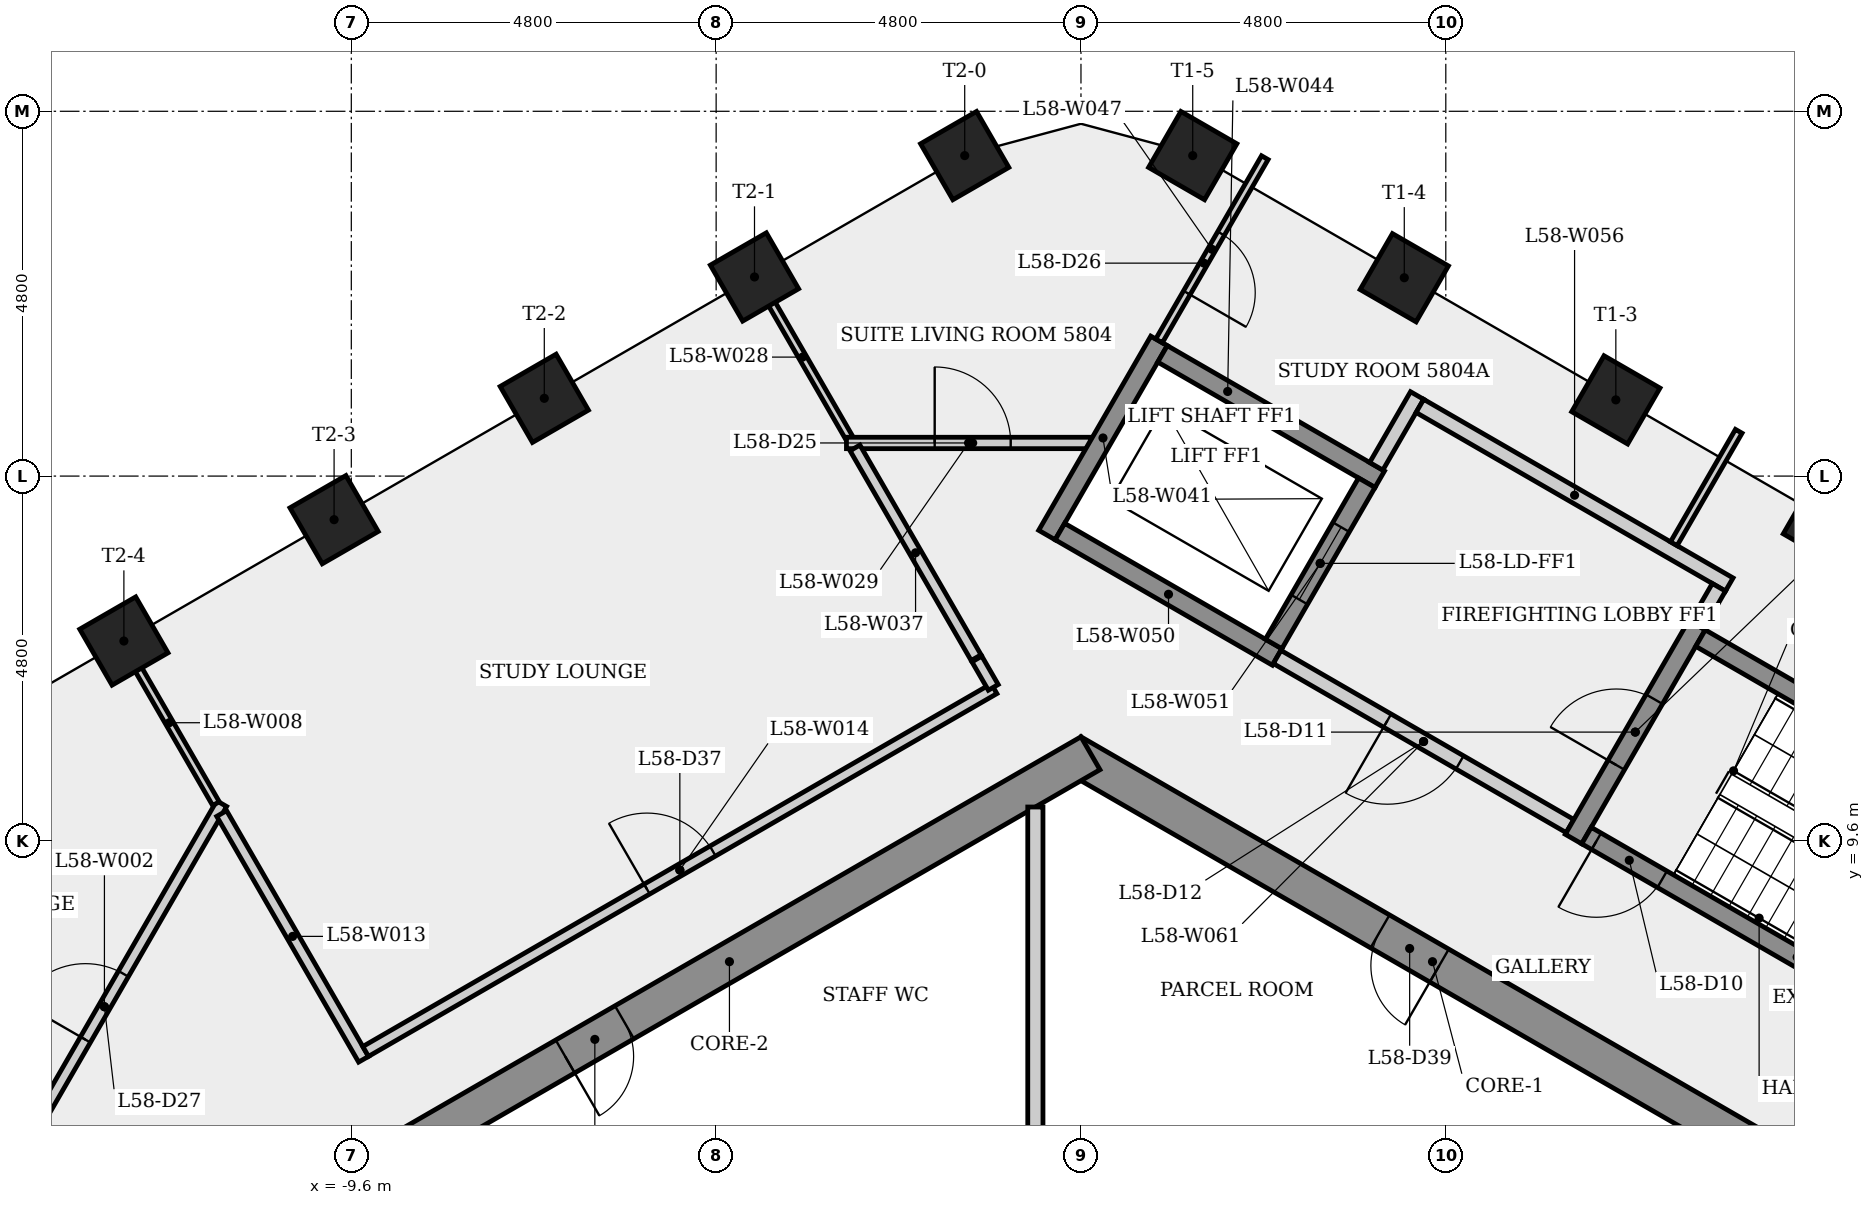
"""IFC4 building model, lengths in metres.
Left out: names, types, materials, properties, quantities, classifications, styles, units other than length and angle.
Written with IfcOpenShell. Run it as: python <this file> out.ifc"""

import sys

from ifc_helpers import new_model, si_unit, direction, frame, frame_2d, origin, origin_2d, place, context, subcontext, project, spatial, rectangle, extrude, element, fill, save


model = new_model("IFC4")
c1 = context("Model", 3, precision=1e-05, world=origin(), true_north=direction((0.0, 1.0)))
c2 = subcontext(c1, "Body", "Model", "MODEL_VIEW")
j1 = project(units=[si_unit("LENGTHUNIT", "METRE"), si_unit("PLANEANGLEUNIT", "RADIAN")], contexts=[c1])
p1 = place(None, origin())
s1 = spatial("IfcSite", under=j1, at=p1, CompositionType="ELEMENT")
p2 = place(p1, origin())
s2 = spatial("IfcBuilding", under=s1, at=p2, CompositionType="ELEMENT")
p3 = place(p2, frame((0.0, 0.0, 218.9)))
s3 = spatial("IfcBuildingStorey", under=s2, at=p3, CompositionType="ELEMENT", Elevation=218.9)
p4 = place(p3, frame((9.375, 5.268, 0.0), z_axis=(0.0, 0.0, 1.0), x_axis=(-0.866023993627, 0.500002442456, 0.0)))
e1 = element("IfcWall", 1, at=p4, inside=s3, PredefinedType="SHEAR", context=c2, shape_type="SweptSolid", body=[
    extrude(rectangle(XDim=10.97, YDim=0.5, at=frame_2d((5.485, 0.0))), origin(), (0.0, 0.0, 1.0), 3.4),
])
p5 = place(p4, frame((5.382, 0.0, 0.0)))
e2 = element("IfcOpeningElement", 2, at=p5, cuts=e1, PredefinedType="OPENING", context=c2, shape_type="SweptSolid", body=[
    extrude(rectangle(XDim=0.9, YDim=2.1, at=frame_2d((0.45, 1.05))), frame((0.0, 0.26, 0.0), z_axis=(0.0, -1.0, 0.0), x_axis=(1.0, 0.0, 0.0)), (0.0, 0.0, 1.0), 0.52),
])
p6 = place(p3, frame((0.125, 10.753, 0.0), z_axis=(0.0, 0.0, 1.0), x_axis=(-0.866023993627, -0.500002442456, 0.0)))
e3 = element("IfcWall", 3, at=p6, inside=s3, PredefinedType="SHEAR", context=c2, shape_type="SweptSolid", body=[
    extrude(rectangle(XDim=10.97, YDim=0.5, at=frame_2d((5.485, 0.0))), origin(), (0.0, 0.0, 1.0), 3.4),
])
p7 = place(p6, frame((7.08, 0.0, 0.0)))
e4 = element("IfcOpeningElement", 4, at=p7, cuts=e3, PredefinedType="OPENING", context=c2, shape_type="SweptSolid", body=[
    extrude(rectangle(XDim=0.9, YDim=2.1, at=frame_2d((0.45, 1.05))), frame((0.0, 0.26, 0.0), z_axis=(0.0, -1.0, 0.0), x_axis=(1.0, 0.0, 0.0)), (0.0, 0.0, 1.0), 0.52),
])
for number, where, z_axis, x_axis in (
    (5, (9.821, 13.796, 0.0), (0.0, 0.0, 1.0), (0.5, 0.866, 0.0)),
    (6, (7.037, 15.403, 0.0), (0.0, 0.0, 1.0), (0.5, 0.866, 0.0)),
    (7, (4.254, 17.01, 0.0), (0.0, 0.0, 1.0), (0.5, 0.866, 0.0)),
    (8, (1.47, 18.617, 0.0), (0.0, 0.0, 1.0), (0.5, 0.866, 0.0)),
    (9, (-1.53, 18.617, 0.0), (0.0, 0.0, 1.0), (-0.5, 0.866, 0.0)),
    (10, (-4.295, 17.02, 0.0), (0.0, 0.0, 1.0), (-0.5, 0.866, 0.0)),
    (11, (-7.061, 15.423, 0.0), (0.0, 0.0, 1.0), (-0.5, 0.866, 0.0)),
    (12, (-9.827, 13.827, 0.0), (0.0, 0.0, 1.0), (-0.5, 0.866, 0.0)),
    (13, (-12.592, 12.23, 0.0), (0.0, 0.0, 1.0), (-0.5, 0.866, 0.0)),
):
    element("IfcColumn", number, at=place(p3, frame(where, z_axis=z_axis, x_axis=x_axis)), inside=s3, PredefinedType="COLUMN", context=c2, shape_type="SweptSolid", body=[
        extrude(rectangle(XDim=0.85, YDim=0.85, at=origin_2d()), origin(), (0.0, 0.0, 1.0), 3.4),
    ])
p8 = place(p3, frame((-14.391, 4.746, 0.0), z_axis=(0.0, 0.0, 1.0), x_axis=(0.500023814363, 0.866011654119, 0.0)))
e14 = element("IfcWall", 14, at=p8, inside=s3, PredefinedType="PARTITIONING", context=c2, shape_type="SweptSolid", body=[
    extrude(rectangle(XDim=6.171, YDim=0.15, at=frame_2d((3.085, 0.0))), origin(), (0.0, 0.0, 1.0), 3.05),
])
p9 = place(p8, frame((2.585, 0.0, 0.0)))
e15 = element("IfcOpeningElement", 15, at=p9, cuts=e14, PredefinedType="OPENING", context=c2, shape_type="SweptSolid", body=[
    extrude(rectangle(XDim=1.0, YDim=2.1, at=frame_2d((0.5, 1.05))), frame((0.0, 0.085, 0.0), z_axis=(0.0, -1.0, 0.0), x_axis=(1.0, 0.0, 0.0)), (0.0, 0.0, 1.0), 0.17),
])
p10 = place(p3, frame((-12.61, 12.219, 0.0), z_axis=(0.0, 0.0, 1.0), x_axis=(0.500026134388, -0.866010314562, 0.0)))
e16 = element("IfcWall", 16, at=p10, inside=s3, PredefinedType="PARTITIONING", context=c2, shape_type="SweptSolid", body=[
    extrude(rectangle(XDim=2.459, YDim=0.1, at=frame_2d((1.229, 0.0))), origin(), (0.0, 0.0, 1.0), 3.05),
])
p11 = place(p3, frame((-11.305, 9.96, 0.0), z_axis=(0.0, 0.0, 1.0), x_axis=(0.499979060117, -0.866037493094, 0.0)))
e17 = element("IfcWall", 17, at=p11, inside=s3, PredefinedType="PARTITIONING", context=c2, shape_type="SweptSolid", body=[
    extrude(rectangle(XDim=3.734, YDim=0.15, at=frame_2d((1.867, 0.0))), origin(), (0.0, 0.0, 1.0), 3.05),
])
p12 = place(p3, frame((-9.411, 6.829, 0.0), z_axis=(0.0, 0.0, 1.0), x_axis=(0.866029717158, 0.499992528944, 0.0)))
e18 = element("IfcWall", 18, at=p12, inside=s3, PredefinedType="PARTITIONING", context=c2, shape_type="SweptSolid", body=[
    extrude(rectangle(XDim=9.547, YDim=0.15, at=frame_2d((4.773, 0.0))), origin(), (0.0, 0.0, 1.0), 3.05),
])
p13 = place(p12, frame((4.273, 0.0, 0.0)))
e19 = element("IfcOpeningElement", 19, at=p13, cuts=e18, PredefinedType="OPENING", context=c2, shape_type="SweptSolid", body=[
    extrude(rectangle(XDim=1.0, YDim=2.1, at=frame_2d((0.5, 1.05))), frame((0.0, 0.085, 0.0), z_axis=(0.0, -1.0, 0.0), x_axis=(1.0, 0.0, 0.0)), (0.0, 0.0, 1.0), 0.17),
])
p14 = place(p3, frame((-3.048, 14.901, 0.0), z_axis=(0.0, 0.0, 1.0), x_axis=(-0.499983141994, 0.86603513654, 0.0)))
e20 = element("IfcWall", 20, at=p14, inside=s3, PredefinedType="PARTITIONING", context=c2, shape_type="SweptSolid", body=[
    extrude(rectangle(XDim=2.459, YDim=0.1, at=frame_2d((1.229, 0.0))), origin(), (0.0, 0.0, 1.0), 3.05),
])
p15 = place(p3, frame((-3.085, 14.836, 0.0), z_axis=(0.0, 0.0, 1.0), x_axis=(1.0, 0.0, 0.0)))
e21 = element("IfcWall", 21, at=p15, inside=s3, PredefinedType="PARTITIONING", context=c2, shape_type="SweptSolid", body=[
    extrude(rectangle(XDim=3.212, YDim=0.15, at=frame_2d((1.606, 0.0))), origin(), (0.0, 0.0, 1.0), 3.05),
])
p16 = place(p15, frame((1.161, 0.0, 0.0)))
e22 = element("IfcOpeningElement", 22, at=p16, cuts=e21, PredefinedType="OPENING", context=c2, shape_type="SweptSolid", body=[
    extrude(rectangle(XDim=1.0, YDim=2.1, at=frame_2d((0.5, 1.05))), frame((0.0, 0.085, 0.0), z_axis=(0.0, -1.0, 0.0), x_axis=(1.0, 0.0, 0.0)), (0.0, 0.0, 1.0), 0.17),
])
p17 = place(p3, frame((-1.379, 12.011, 0.0), z_axis=(0.0, 0.0, 1.0), x_axis=(-0.49997000245, 0.866042722185, 0.0)))
e23 = element("IfcWall", 23, at=p17, inside=s3, PredefinedType="PARTITIONING", context=c2, shape_type="SweptSolid", body=[
    extrude(rectangle(XDim=3.187, YDim=0.15, at=frame_2d((1.594, 0.0))), origin(), (0.0, 0.0, 1.0), 3.05),
])
p18 = place(p3, frame((-1.369, 11.993, 0.0), z_axis=(0.0, 0.0, 1.0), x_axis=(0.499853131152, -0.86611018195, 0.0)))
e24 = element("IfcWall", 24, at=p18, inside=s3, PredefinedType="PARTITIONING", context=c2, shape_type="SweptSolid", body=[
    extrude(rectangle(XDim=0.431, YDim=0.15, at=frame_2d((0.216, 0.0))), origin(), (0.0, 0.0, 1.0), 3.05),
])
p19 = place(p3, frame((-0.6, 10.046, 0.0), z_axis=(0.0, 0.0, 1.0), x_axis=(0.0, -1.0, 0.0)))
e25 = element("IfcWall", 25, at=p19, inside=s3, PredefinedType="PARTITIONING", context=c2, shape_type="SweptSolid", body=[
    extrude(rectangle(XDim=4.771, YDim=0.2, at=frame_2d((2.385, 0.0))), origin(), (0.0, 0.0, 1.0), 3.05),
])
p20 = place(p3, frame((-0.448, 13.624, 0.0), z_axis=(0.0, 0.0, 1.0), x_axis=(0.500037662692, 0.866003658127, 0.0)))
e26 = element("IfcWall", 26, at=p20, inside=s3, PredefinedType="SHEAR", context=c2, shape_type="SweptSolid", body=[
    extrude(rectangle(XDim=2.95, YDim=0.25, at=frame_2d((1.475, 0.0))), origin(), (0.0, 0.0, 1.0), 3.05),
])
p21 = place(p3, frame((1.073, 16.008, 0.0), z_axis=(0.0, 0.0, 1.0), x_axis=(0.866040211805, -0.499974350878, 0.0)))
e27 = element("IfcWall", 27, at=p21, inside=s3, PredefinedType="SHEAR", context=c2, shape_type="SweptSolid", body=[
    extrude(rectangle(XDim=3.3, YDim=0.25, at=frame_2d((1.65, 0.0))), origin(), (0.0, 0.0, 1.0), 3.05),
])
p22 = place(p3, frame((2.419, 18.59, 0.0), z_axis=(0.0, 0.0, 1.0), x_axis=(-0.500016013541, -0.866016158165, 0.0)))
e28 = element("IfcWall", 28, at=p22, inside=s3, PredefinedType="PARTITIONING", context=c2, shape_type="SweptSolid", body=[
    extrude(rectangle(XDim=2.784, YDim=0.1, at=frame_2d((1.392, 0.0))), origin(), (0.0, 0.0, 1.0), 3.05),
])
p23 = place(p22, frame((1.152, 0.0, 0.0)))
e29 = element("IfcOpeningElement", 29, at=p23, cuts=e28, PredefinedType="OPENING", context=c2, shape_type="SweptSolid", body=[
    extrude(rectangle(XDim=0.9, YDim=2.1, at=frame_2d((0.45, 1.05))), frame((0.0, 0.06, 0.0), z_axis=(0.0, -1.0, 0.0), x_axis=(1.0, 0.0, 0.0)), (0.0, 0.0, 1.0), 0.12),
])
p24 = place(p3, frame((2.581, 12.02, 0.0), z_axis=(0.0, 0.0, 1.0), x_axis=(-0.866040211805, 0.499974350878, 0.0)))
e30 = element("IfcWall", 30, at=p24, inside=s3, PredefinedType="SHEAR", context=c2, shape_type="SweptSolid", body=[
    extrude(rectangle(XDim=3.3, YDim=0.25, at=frame_2d((1.65, 0.0))), origin(), (0.0, 0.0, 1.0), 3.05),
])
p25 = place(p3, frame((2.535, 12.191, 0.0), z_axis=(0.0, 0.0, 1.0), x_axis=(0.500061746146, 0.865989751695, 0.0)))
e31 = element("IfcWall", 31, at=p25, inside=s3, PredefinedType="SHEAR", context=c2, shape_type="SweptSolid", body=[
    extrude(rectangle(XDim=2.45, YDim=0.25, at=frame_2d((1.225, 0.0))), origin(), (0.0, 0.0, 1.0), 3.4),
])
p26 = place(p25, frame((0.675, 0.0, 0.0)))
e32 = element("IfcOpeningElement", 32, at=p26, cuts=e31, PredefinedType="OPENING", context=c2, shape_type="SweptSolid", body=[
    extrude(rectangle(XDim=1.1, YDim=2.1, at=frame_2d((0.55, 1.05))), frame((0.0, 0.135, 0.0), z_axis=(0.0, -1.0, 0.0), x_axis=(1.0, 0.0, 0.0)), (0.0, 0.0, 1.0), 0.27),
])
p27 = place(p3, frame((3.885, 14.529, 0.0), z_axis=(0.0, 0.0, 1.0), x_axis=(0.499997628298, 0.866026773083, 0.0)))
e33 = element("IfcWall", 33, at=p27, inside=s3, PredefinedType="PARTITIONING", context=c2, shape_type="SweptSolid", body=[
    extrude(rectangle(XDim=1.075, YDim=0.2, at=frame_2d((0.538, 0.0))), origin(), (0.0, 0.0, 1.0), 3.05),
])
p28 = place(p3, frame((4.459, 15.323, 0.0), z_axis=(0.0, 0.0, 1.0), x_axis=(0.866016039709, -0.500016218704, 0.0)))
e34 = element("IfcWall", 34, at=p28, inside=s3, PredefinedType="PARTITIONING", context=c2, shape_type="SweptSolid", body=[
    extrude(rectangle(XDim=4.7, YDim=0.2, at=frame_2d((2.35, 0.0))), origin(), (0.0, 0.0, 1.0), 3.05),
])
p29 = place(p3, frame((6.435, 9.795, 0.0), z_axis=(0.0, 0.0, 1.0), x_axis=(-0.866012907634, 0.500021643343, 0.0)))
e35 = element("IfcWall", 35, at=p29, inside=s3, PredefinedType="PARTITIONING", context=c2, shape_type="SweptSolid", body=[
    extrude(rectangle(XDim=4.45, YDim=0.2, at=frame_2d((2.225, 0.0))), origin(), (0.0, 0.0, 1.0), 3.05),
])
p30 = place(p29, frame((1.675, 0.0, 0.0)))
e36 = element("IfcOpeningElement", 36, at=p30, cuts=e35, PredefinedType="OPENING", context=c2, shape_type="SweptSolid", body=[
    extrude(rectangle(XDim=1.1, YDim=2.1, at=frame_2d((0.55, 1.05))), frame((0.0, 0.11, 0.0), z_axis=(0.0, -1.0, 0.0), x_axis=(1.0, 0.0, 0.0)), (0.0, 0.0, 1.0), 0.22),
])
p31 = place(p3, frame((6.48, 9.624, 0.0), z_axis=(0.0, 0.0, 1.0), x_axis=(0.500017246033, 0.866015446554, 0.0)))
e37 = element("IfcWall", 37, at=p31, inside=s3, PredefinedType="SHEAR", context=c2, shape_type="SweptSolid", body=[
    extrude(rectangle(XDim=3.25, YDim=0.25, at=frame_2d((1.625, 0.0))), origin(), (0.0, 0.0, 1.0), 3.05),
])
p32 = place(p31, frame((1.125, 0.0, 0.0)))
e38 = element("IfcOpeningElement", 38, at=p32, cuts=e37, PredefinedType="OPENING", context=c2, shape_type="SweptSolid", body=[
    extrude(rectangle(XDim=1.0, YDim=2.1, at=frame_2d((0.5, 1.05))), frame((0.0, 0.135, 0.0), z_axis=(0.0, -1.0, 0.0), x_axis=(1.0, 0.0, 0.0)), (0.0, 0.0, 1.0), 0.27),
])
p33 = place(p3, frame((7.8, 13.51, 0.0), z_axis=(0.0, 0.0, 1.0), x_axis=(0.500027584368, 0.866009477356, 0.0)))
e39 = element("IfcWall", 39, at=p33, inside=s3, PredefinedType="PARTITIONING", context=c2, shape_type="SweptSolid", body=[
    extrude(rectangle(XDim=1.708, YDim=0.1, at=frame_2d((0.854, 0.0))), origin(), (0.0, 0.0, 1.0), 3.05),
])
p34 = place(p3, frame((8.151, 12.268, 0.0), z_axis=(0.0, 0.0, 1.0), x_axis=(0.866025499775, -0.499999833739, 0.0)))
e40 = element("IfcWall", 40, at=p34, inside=s3, PredefinedType="SHEAR", context=c2, shape_type="SweptSolid", body=[
    extrude(rectangle(XDim=6.4, YDim=0.25, at=frame_2d((3.2, 0.0))), origin(), (0.0, 0.0, 1.0), 3.05),
])
p35 = place(p3, frame((8.393, 12.937, 0.0), z_axis=(0.0, 0.0, 1.0), x_axis=(-0.500065409566, -0.86598763626, 0.0)))
e41 = element("IfcWall", 41, at=p35, inside=s3, PredefinedType="PARTITIONING", context=c2, shape_type="SweptSolid", body=[
    extrude(rectangle(XDim=0.575, YDim=0.2, at=frame_2d((0.288, 0.0))), origin(), (0.0, 0.0, 1.0), 3.05),
])
p36 = place(p3, frame((12.194, 6.47, 0.0), z_axis=(0.0, 0.0, 1.0), x_axis=(-0.866025499775, 0.499999833739, 0.0)))
e42 = element("IfcWall", 42, at=p36, inside=s3, PredefinedType="SHEAR", context=c2, shape_type="SweptSolid", body=[
    extrude(rectangle(XDim=6.4, YDim=0.25, at=frame_2d((3.2, 0.0))), origin(), (0.0, 0.0, 1.0), 3.05),
])
p37 = place(p36, frame((5.25, 0.0, 0.0)))
e43 = element("IfcOpeningElement", 43, at=p37, cuts=e42, PredefinedType="OPENING", context=c2, shape_type="SweptSolid", body=[
    extrude(rectangle(XDim=1.0, YDim=2.1, at=frame_2d((0.5, 1.05))), frame((0.0, 0.135, 0.0), z_axis=(0.0, -1.0, 0.0), x_axis=(1.0, 0.0, 0.0)), (0.0, 0.0, 1.0), 0.27),
])
p38 = place(p37, origin())
e44 = element("IfcDoor", 44, at=p38, inside=s3, OperationType="SINGLE_SWING_RIGHT", PredefinedType="DOOR", context=c2, shape_type="SweptSolid", body=[
    extrude(rectangle(XDim=1.0, YDim=2.1, at=frame_2d((0.5, 1.05))), frame((0.0, 0.025, 0.0), z_axis=(0.0, -1.0, 0.0), x_axis=(1.0, 0.0, 0.0)), (0.0, 0.0, 1.0), 0.05),
])
fill(e43, e44)
p39 = place(p32, origin())
e45 = element("IfcDoor", 45, at=p39, inside=s3, OperationType="SINGLE_SWING_LEFT", PredefinedType="DOOR", context=c2, shape_type="SweptSolid", body=[
    extrude(rectangle(XDim=1.0, YDim=2.1, at=frame_2d((0.5, 1.05))), frame((0.0, 0.025, 0.0), z_axis=(0.0, -1.0, 0.0), x_axis=(1.0, 0.0, 0.0)), (0.0, 0.0, 1.0), 0.05),
])
fill(e38, e45)
p40 = place(p30, origin())
e46 = element("IfcDoor", 46, at=p40, inside=s3, OperationType="SINGLE_SWING_RIGHT", PredefinedType="DOOR", context=c2, shape_type="SweptSolid", body=[
    extrude(rectangle(XDim=1.1, YDim=2.1, at=frame_2d((0.55, 1.05))), frame((0.0, 0.025, 0.0), z_axis=(0.0, -1.0, 0.0), x_axis=(1.0, 0.0, 0.0)), (0.0, 0.0, 1.0), 0.05),
])
fill(e36, e46)
p41 = place(p26, origin())
e47 = element("IfcDoor", 47, at=p41, inside=s3, OperationType="SLIDING_TO_LEFT", PredefinedType="DOOR", context=c2, shape_type="SweptSolid", body=[
    extrude(rectangle(XDim=1.1, YDim=2.1, at=frame_2d((0.55, 1.05))), frame((0.0, 0.025, 0.0), z_axis=(0.0, -1.0, 0.0), x_axis=(1.0, 0.0, 0.0)), (0.0, 0.0, 1.0), 0.05),
])
fill(e32, e47)
p42 = place(p16, origin())
e48 = element("IfcDoor", 48, at=p42, inside=s3, OperationType="SINGLE_SWING_LEFT", PredefinedType="DOOR", context=c2, shape_type="SweptSolid", body=[
    extrude(rectangle(XDim=1.0, YDim=2.1, at=frame_2d((0.5, 1.05))), frame((0.0, 0.025, 0.0), z_axis=(0.0, -1.0, 0.0), x_axis=(1.0, 0.0, 0.0)), (0.0, 0.0, 1.0), 0.05),
])
fill(e22, e48)
p43 = place(p23, origin())
e49 = element("IfcDoor", 49, at=p43, inside=s3, OperationType="SINGLE_SWING_RIGHT", PredefinedType="DOOR", context=c2, shape_type="SweptSolid", body=[
    extrude(rectangle(XDim=0.9, YDim=2.1, at=frame_2d((0.45, 1.05))), frame((0.0, 0.025, 0.0), z_axis=(0.0, -1.0, 0.0), x_axis=(1.0, 0.0, 0.0)), (0.0, 0.0, 1.0), 0.05),
])
fill(e29, e49)
p44 = place(p9, origin())
e50 = element("IfcDoor", 50, at=p44, inside=s3, OperationType="SINGLE_SWING_LEFT", PredefinedType="DOOR", context=c2, shape_type="SweptSolid", body=[
    extrude(rectangle(XDim=1.0, YDim=2.1, at=frame_2d((0.5, 1.05))), frame((0.0, 0.025, 0.0), z_axis=(0.0, -1.0, 0.0), x_axis=(1.0, 0.0, 0.0)), (0.0, 0.0, 1.0), 0.05),
])
fill(e15, e50)
p45 = place(p13, origin())
e51 = element("IfcDoor", 51, at=p45, inside=s3, OperationType="SINGLE_SWING_LEFT", PredefinedType="DOOR", context=c2, shape_type="SweptSolid", body=[
    extrude(rectangle(XDim=1.0, YDim=2.1, at=frame_2d((0.5, 1.05))), frame((0.0, 0.025, 0.0), z_axis=(0.0, -1.0, 0.0), x_axis=(1.0, 0.0, 0.0)), (0.0, 0.0, 1.0), 0.05),
])
fill(e19, e51)
p46 = place(p7, origin())
e52 = element("IfcDoor", 52, at=p46, inside=s3, OperationType="SINGLE_SWING_RIGHT", PredefinedType="DOOR", context=c2, shape_type="SweptSolid", body=[
    extrude(rectangle(XDim=0.9, YDim=2.1, at=frame_2d((0.45, 1.05))), frame((0.0, 0.025, 0.0), z_axis=(0.0, -1.0, 0.0), x_axis=(1.0, 0.0, 0.0)), (0.0, 0.0, 1.0), 0.05),
])
fill(e4, e52)
p47 = place(p5, origin())
e53 = element("IfcDoor", 53, at=p47, inside=s3, OperationType="SINGLE_SWING_LEFT", PredefinedType="DOOR", context=c2, shape_type="SweptSolid", body=[
    extrude(rectangle(XDim=0.9, YDim=2.1, at=frame_2d((0.45, 1.05))), frame((0.0, 0.025, 0.0), z_axis=(0.0, -1.0, 0.0), x_axis=(1.0, 0.0, 0.0)), (0.0, 0.0, 1.0), 0.05),
])
fill(e2, e53)
save(model, sys.argv[1])
